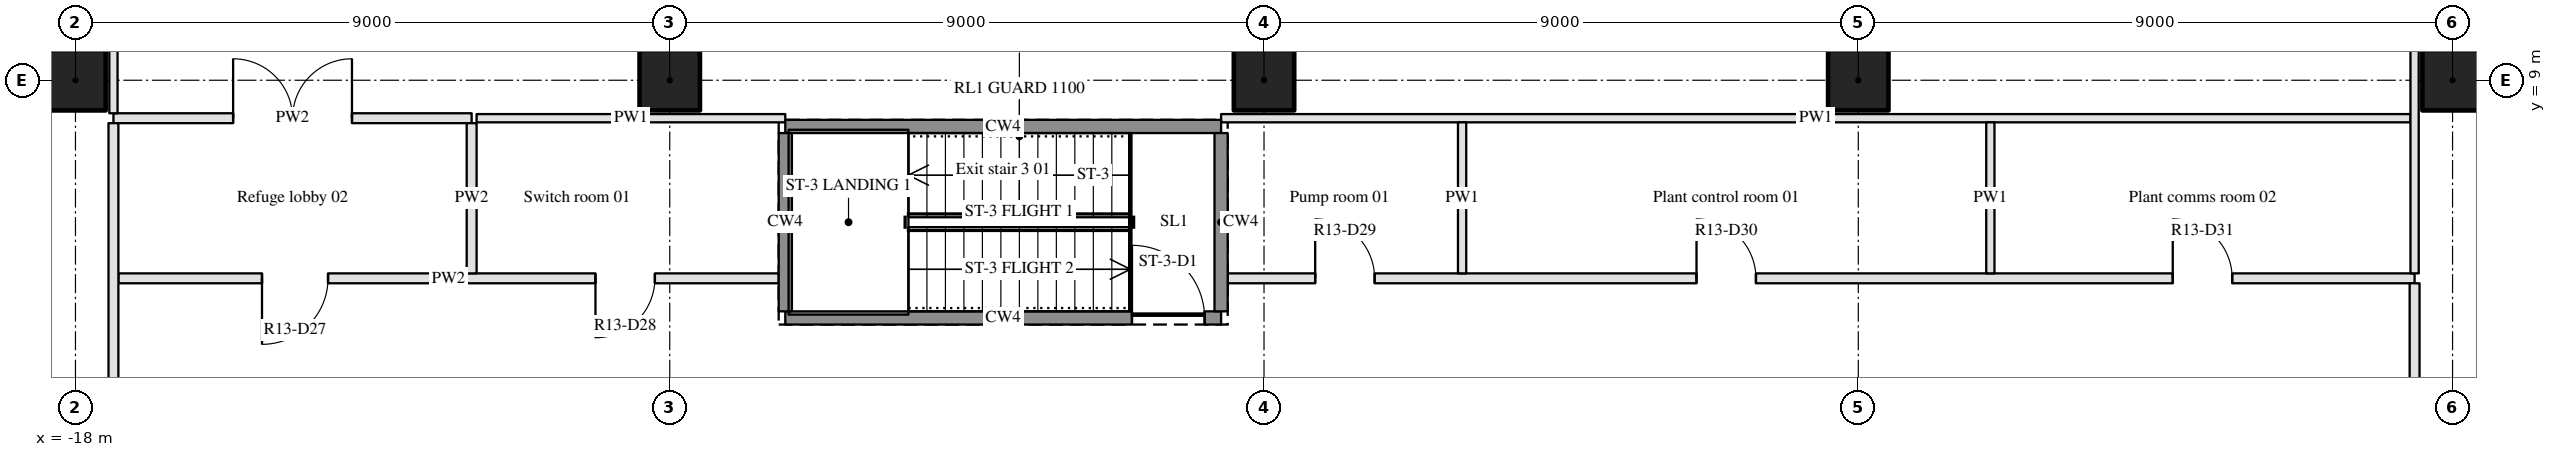
"""IFC4 building model, lengths in metres.
Left out: names, types, materials, properties, quantities, classifications, styles, units other than length and angle.
Written with IfcOpenShell. Run it as: python <this file> out.ifc"""

import sys

from ifc_helpers import new_model, si_unit, direction, frame, frame_2d, origin, origin_2d, place, context, subcontext, project, spatial, rectangle, hollow_circle, extrude, element, fill, save


model = new_model("IFC4")
c1 = context("Model", 3, precision=1e-05, world=origin(), true_north=direction((0.0, 1.0)))
c2 = subcontext(c1, "Body", "Model", "MODEL_VIEW")
j1 = project(units=[si_unit("LENGTHUNIT", "METRE"), si_unit("PLANEANGLEUNIT", "RADIAN")], contexts=[c1])
p1 = place(None, origin())
s1 = spatial("IfcSite", under=j1, at=p1, CompositionType="ELEMENT")
p2 = place(p1, origin())
s2 = spatial("IfcBuilding", under=s1, at=p2, CompositionType="ELEMENT")
p3 = place(p2, frame((0.0, 0.0, 57.6)))
s3 = spatial("IfcBuildingStorey", under=s2, at=p3, CompositionType="ELEMENT", Elevation=57.6)
for number, where, z_axis, x_axis in (
    (1, (-18.0, 9.0, 0.0), (0.0, 0.0, 1.0), (1.0, 0.0, 0.0)),
    (2, (-9.0, 9.0, 0.0), (0.0, 0.0, 1.0), (1.0, 0.0, 0.0)),
    (3, (0.0, 9.0, 0.0), (0.0, 0.0, 1.0), (1.0, 0.0, 0.0)),
    (4, (9.0, 9.0, 0.0), (0.0, 0.0, 1.0), (1.0, 0.0, 0.0)),
    (5, (18.0, 9.0, 0.0), (0.0, 0.0, 1.0), (1.0, 0.0, 0.0)),
):
    element("IfcColumn", number, at=place(p3, frame(where, z_axis=z_axis, x_axis=x_axis)), inside=s3, PredefinedType="COLUMN", context=c2, shape_type="SweptSolid", body=[
        extrude(hollow_circle(Radius=0.457, WallThickness=0.05, at=origin_2d()), origin(), (0.0, 0.0, 1.0), 4.5),
    ])
p4 = place(p3, frame((-7.25, 5.4, 0.0), z_axis=(0.0, 0.0, 1.0), x_axis=(1.0, 0.0, 0.0)))
e6 = element("IfcWall", 6, at=p4, inside=s3, PredefinedType="SHEAR", context=c2, shape_type="SweptSolid", body=[
    extrude(rectangle(XDim=6.6, YDim=0.2, at=frame_2d((3.3, 0.0))), origin(), (0.0, 0.0, 1.0), 4.5),
])
p5 = place(p4, frame((5.25, 0.0, 0.0)))
e7 = element("IfcOpeningElement", 7, at=p5, cuts=e6, PredefinedType="OPENING", context=c2, shape_type="SweptSolid", body=[
    extrude(rectangle(XDim=1.1, YDim=2.1, at=frame_2d((0.55, 1.05))), frame((0.0, 0.11, 0.0), z_axis=(0.0, -1.0, 0.0), x_axis=(1.0, 0.0, 0.0)), (0.0, 0.0, 1.0), 0.22),
])
p6 = place(p3, frame((-7.35, 6.0, 0.0), z_axis=(0.0, 0.0, 1.0), x_axis=(-1.0, 0.0, 0.0)))
e8 = element("IfcWall", 8, at=p6, inside=s3, PredefinedType="PARTITIONING", context=c2, shape_type="SweptSolid", body=[
    extrude(rectangle(XDim=10.0, YDim=0.15, at=frame_2d((5.0, 0.0))), origin(), (0.0, 0.0, 1.0), 3.56),
])
p7 = place(p6, frame((6.825, 0.0, 0.0)))
e9 = element("IfcOpeningElement", 9, at=p7, cuts=e8, PredefinedType="OPENING", context=c2, shape_type="SweptSolid", body=[
    extrude(rectangle(XDim=1.0, YDim=2.1, at=frame_2d((0.5, 1.05))), frame((0.0, 0.085, 0.0), z_axis=(0.0, -1.0, 0.0), x_axis=(1.0, 0.0, 0.0)), (0.0, 0.0, 1.0), 0.17),
])
p8 = place(p6, frame((1.875, 0.0, 0.0)))
e10 = element("IfcOpeningElement", 10, at=p8, cuts=e8, PredefinedType="OPENING", context=c2, shape_type="SweptSolid", body=[
    extrude(rectangle(XDim=0.9, YDim=2.1, at=frame_2d((0.45, 1.05))), frame((0.0, 0.085, 0.0), z_axis=(0.0, -1.0, 0.0), x_axis=(1.0, 0.0, 0.0)), (0.0, 0.0, 1.0), 0.17),
])
p9 = place(p3, frame((-0.55, 6.0, 0.0), z_axis=(0.0, 0.0, 1.0), x_axis=(1.0, 0.0, 0.0)))
e11 = element("IfcWall", 11, at=p9, inside=s3, PredefinedType="PARTITIONING", context=c2, shape_type="SweptSolid", body=[
    extrude(rectangle(XDim=17.975, YDim=0.15, at=frame_2d((8.988, 0.0))), origin(), (0.0, 0.0, 1.0), 3.56),
])
p10 = place(p9, frame((1.325, 0.0, 0.0)))
e12 = element("IfcOpeningElement", 12, at=p10, cuts=e11, PredefinedType="OPENING", context=c2, shape_type="SweptSolid", body=[
    extrude(rectangle(XDim=0.9, YDim=2.1, at=frame_2d((0.45, 1.05))), frame((0.0, 0.085, 0.0), z_axis=(0.0, -1.0, 0.0), x_axis=(1.0, 0.0, 0.0)), (0.0, 0.0, 1.0), 0.17),
])
p11 = place(p9, frame((7.1, 0.0, 0.0)))
e13 = element("IfcOpeningElement", 13, at=p11, cuts=e11, PredefinedType="OPENING", context=c2, shape_type="SweptSolid", body=[
    extrude(rectangle(XDim=0.9, YDim=2.1, at=frame_2d((0.45, 1.05))), frame((0.0, 0.085, 0.0), z_axis=(0.0, -1.0, 0.0), x_axis=(1.0, 0.0, 0.0)), (0.0, 0.0, 1.0), 0.17),
])
p12 = place(p9, frame((14.312, 0.0, 0.0)))
e14 = element("IfcOpeningElement", 14, at=p12, cuts=e11, PredefinedType="OPENING", context=c2, shape_type="SweptSolid", body=[
    extrude(rectangle(XDim=0.9, YDim=2.1, at=frame_2d((0.45, 1.05))), frame((0.0, 0.085, 0.0), z_axis=(0.0, -1.0, 0.0), x_axis=(1.0, 0.0, 0.0)), (0.0, 0.0, 1.0), 0.17),
])
p13 = place(p3, frame((-7.25, 8.3, 0.0), z_axis=(0.0, 0.0, 1.0), x_axis=(1.0, 0.0, 0.0)))
e15 = element("IfcWall", 15, at=p13, inside=s3, PredefinedType="SHEAR", context=c2, shape_type="SweptSolid", body=[
    extrude(rectangle(XDim=6.6, YDim=0.2, at=frame_2d((3.3, 0.0))), origin(), (0.0, 0.0, 1.0), 4.5),
])
p14 = place(p3, frame((-17.425, 8.425, 0.0), z_axis=(0.0, 0.0, 1.0), x_axis=(1.0, 0.0, 0.0)))
e16 = element("IfcWall", 16, at=p14, inside=s3, PredefinedType="PARTITIONING", context=c2, shape_type="SweptSolid", body=[
    extrude(rectangle(XDim=5.425, YDim=0.15, at=frame_2d((2.712, 0.0))), origin(), (0.0, 0.0, 1.0), 3.56),
])
p15 = place(p14, frame((1.812, 0.0, 0.0)))
e17 = element("IfcOpeningElement", 17, at=p15, cuts=e16, PredefinedType="OPENING", context=c2, shape_type="SweptSolid", body=[
    extrude(rectangle(XDim=1.8, YDim=2.1, at=frame_2d((0.9, 1.05))), frame((0.0, 0.085, 0.0), z_axis=(0.0, -1.0, 0.0), x_axis=(1.0, 0.0, 0.0)), (0.0, 0.0, 1.0), 0.17),
])
p16 = place(p3, frame((-11.925, 8.425, 0.0), z_axis=(0.0, 0.0, 1.0), x_axis=(1.0, 0.0, 0.0)))
e18 = element("IfcWall", 18, at=p16, inside=s3, PredefinedType="PARTITIONING", context=c2, shape_type="SweptSolid", body=[
    extrude(rectangle(XDim=4.675, YDim=0.125, at=frame_2d((2.337, 0.0))), origin(), (0.0, 0.0, 1.0), 3.56),
])
p17 = place(p3, frame((-0.65, 8.425, 0.0), z_axis=(0.0, 0.0, 1.0), x_axis=(1.0, 0.0, 0.0)))
e19 = element("IfcWall", 19, at=p17, inside=s3, PredefinedType="PARTITIONING", context=c2, shape_type="SweptSolid", body=[
    extrude(rectangle(XDim=18.012, YDim=0.125, at=frame_2d((9.006, 0.0))), origin(), (0.0, 0.0, 1.0), 3.56),
])
p18 = place(p3, frame((-17.425, 8.35, 0.0), z_axis=(0.0, 0.0, 1.0), x_axis=(0.0, -1.0, 0.0)))
e20 = element("IfcWall", 20, at=p18, inside=s3, PredefinedType="PARTITIONING", context=c2, shape_type="SweptSolid", body=[
    extrude(rectangle(XDim=23.275, YDim=0.15, at=frame_2d((11.638, 0.0))), origin(), (0.0, 0.0, 1.0), 3.56),
])
p19 = place(p18, frame((19.413, 0.0, 0.0)))
e21 = element("IfcOpeningElement", 21, at=p19, cuts=e20, PredefinedType="OPENING", context=c2, shape_type="SweptSolid", body=[
    extrude(rectangle(XDim=1.8, YDim=2.1, at=frame_2d((0.9, 1.05))), frame((0.0, 0.085, 0.0), z_axis=(0.0, -1.0, 0.0), x_axis=(1.0, 0.0, 0.0)), (0.0, 0.0, 1.0), 0.17),
])
p20 = place(p18, frame((11.05, 0.0, 0.0)))
e22 = element("IfcOpeningElement", 22, at=p20, cuts=e20, PredefinedType="OPENING", context=c2, shape_type="SweptSolid", body=[
    extrude(rectangle(XDim=1.8, YDim=2.1, at=frame_2d((0.9, 1.05))), frame((0.0, 0.085, 0.0), z_axis=(0.0, -1.0, 0.0), x_axis=(1.0, 0.0, 0.0)), (0.0, 0.0, 1.0), 0.17),
])
p21 = place(p18, frame((6.0, 0.0, 0.0)))
e23 = element("IfcOpeningElement", 23, at=p21, cuts=e20, PredefinedType="OPENING", context=c2, shape_type="SweptSolid", body=[
    extrude(rectangle(XDim=1.8, YDim=2.1, at=frame_2d((0.9, 1.05))), frame((0.0, 0.085, 0.0), z_axis=(0.0, -1.0, 0.0), x_axis=(1.0, 0.0, 0.0)), (0.0, 0.0, 1.0), 0.17),
])
p22 = place(p3, frame((-17.425, 8.5, 0.0), z_axis=(0.0, 0.0, 1.0), x_axis=(0.0, 1.0, 0.0)))
e24 = element("IfcWall", 24, at=p22, inside=s3, PredefinedType="PARTITIONING", context=c2, shape_type="SweptSolid", body=[
    extrude(rectangle(XDim=17.557, YDim=0.125, at=frame_2d((8.778, 0.0))), origin(), (0.0, 0.0, 1.0), 3.56),
])
p23 = place(p3, frame((-12.0, 6.075, 0.0), z_axis=(0.0, 0.0, 1.0), x_axis=(0.0, 1.0, 0.0)))
e25 = element("IfcWall", 25, at=p23, inside=s3, PredefinedType="PARTITIONING", context=c2, shape_type="SweptSolid", body=[
    extrude(rectangle(XDim=2.275, YDim=0.15, at=frame_2d((1.138, 0.0))), origin(), (0.0, 0.0, 1.0), 3.56),
])
for number, where, z_axis, x_axis in (
    (26, (-7.25, 5.5, 0.0), (0.0, 0.0, 1.0), (0.0, 1.0, 0.0)),
    (27, (-0.65, 5.5, 0.0), (0.0, 0.0, 1.0), (0.0, 1.0, 0.0)),
):
    element("IfcWall", number, at=place(p3, frame(where, z_axis=z_axis, x_axis=x_axis)), inside=s3, PredefinedType="SHEAR", context=c2, shape_type="SweptSolid", body=[
        extrude(rectangle(XDim=2.7, YDim=0.2, at=frame_2d((1.35, 0.0))), origin(), (0.0, 0.0, 1.0), 4.5),
    ])
for number, where, z_axis, x_axis in (
    (28, (3.0, 6.075, 0.0), (0.0, 0.0, 1.0), (0.0, 1.0, 0.0)),
    (29, (11.0, 6.075, 0.0), (0.0, 0.0, 1.0), (0.0, 1.0, 0.0)),
):
    element("IfcWall", number, at=place(p3, frame(where, z_axis=z_axis, x_axis=x_axis)), inside=s3, PredefinedType="PARTITIONING", context=c2, shape_type="SweptSolid", body=[
        extrude(rectangle(XDim=2.288, YDim=0.125, at=frame_2d((1.144, 0.0))), origin(), (0.0, 0.0, 1.0), 3.56),
    ])
p24 = place(p3, frame((17.425, -14.925, 0.0), z_axis=(0.0, 0.0, 1.0), x_axis=(0.0, 1.0, 0.0)))
e30 = element("IfcWall", 30, at=p24, inside=s3, PredefinedType="PARTITIONING", context=c2, shape_type="SweptSolid", body=[
    extrude(rectangle(XDim=20.85, YDim=0.15, at=frame_2d((10.425, 0.0))), origin(), (0.0, 0.0, 1.0), 3.56),
])
p25 = place(p24, frame((6.562, 0.0, 0.0)))
e31 = element("IfcOpeningElement", 31, at=p25, cuts=e30, PredefinedType="OPENING", context=c2, shape_type="SweptSolid", body=[
    extrude(rectangle(XDim=1.8, YDim=2.1, at=frame_2d((0.9, 1.05))), frame((0.0, 0.085, 0.0), z_axis=(0.0, -1.0, 0.0), x_axis=(1.0, 0.0, 0.0)), (0.0, 0.0, 1.0), 0.17),
])
p26 = place(p24, frame((8.663, 0.0, 0.0)))
e32 = element("IfcOpeningElement", 32, at=p26, cuts=e30, PredefinedType="OPENING", context=c2, shape_type="SweptSolid", body=[
    extrude(rectangle(XDim=1.8, YDim=2.1, at=frame_2d((0.9, 1.05))), frame((0.0, 0.085, 0.0), z_axis=(0.0, -1.0, 0.0), x_axis=(1.0, 0.0, 0.0)), (0.0, 0.0, 1.0), 0.17),
])
p27 = place(p24, frame((16.988, 0.0, 0.0)))
e33 = element("IfcOpeningElement", 33, at=p27, cuts=e30, PredefinedType="OPENING", context=c2, shape_type="SweptSolid", body=[
    extrude(rectangle(XDim=1.8, YDim=2.1, at=frame_2d((0.9, 1.05))), frame((0.0, 0.085, 0.0), z_axis=(0.0, -1.0, 0.0), x_axis=(1.0, 0.0, 0.0)), (0.0, 0.0, 1.0), 0.17),
])
p28 = place(p3, frame((17.425, 6.075, 0.0), z_axis=(0.0, 0.0, 1.0), x_axis=(0.0, 1.0, 0.0)))
e34 = element("IfcWall", 34, at=p28, inside=s3, PredefinedType="PARTITIONING", context=c2, shape_type="SweptSolid", body=[
    extrude(rectangle(XDim=19.982, YDim=0.125, at=frame_2d((9.991, 0.0))), origin(), (0.0, 0.0, 1.0), 3.56),
])
p29 = place(p7, origin())
e35 = element("IfcDoor", 35, at=p29, inside=s3, OperationType="SINGLE_SWING_RIGHT", PredefinedType="DOOR", context=c2, shape_type="SweptSolid", body=[
    extrude(rectangle(XDim=1.0, YDim=2.1, at=frame_2d((0.5, 1.05))), frame((0.0, 0.025, 0.0), z_axis=(0.0, -1.0, 0.0), x_axis=(1.0, 0.0, 0.0)), (0.0, 0.0, 1.0), 0.05),
])
fill(e9, e35)
p30 = place(p15, origin())
e36 = element("IfcDoor", 36, at=p30, inside=s3, OperationType="DOUBLE_DOOR_SINGLE_SWING", PredefinedType="DOOR", context=c2, shape_type="SweptSolid", body=[
    extrude(rectangle(XDim=1.8, YDim=2.1, at=frame_2d((0.9, 1.05))), frame((0.0, 0.025, 0.0), z_axis=(0.0, -1.0, 0.0), x_axis=(1.0, 0.0, 0.0)), (0.0, 0.0, 1.0), 0.05),
])
fill(e17, e36)
p31 = place(p5, origin())
e37 = element("IfcDoor", 37, at=p31, inside=s3, OperationType="SINGLE_SWING_LEFT", PredefinedType="DOOR", context=c2, shape_type="SweptSolid", body=[
    extrude(rectangle(XDim=1.1, YDim=2.1, at=frame_2d((0.55, 1.05))), frame((0.0, 0.025, 0.0), z_axis=(0.0, -1.0, 0.0), x_axis=(1.0, 0.0, 0.0)), (0.0, 0.0, 1.0), 0.05),
])
fill(e7, e37)
p32 = place(p8, origin())
e38 = element("IfcDoor", 38, at=p32, inside=s3, OperationType="SINGLE_SWING_RIGHT", PredefinedType="DOOR", context=c2, shape_type="SweptSolid", body=[
    extrude(rectangle(XDim=0.9, YDim=2.1, at=frame_2d((0.45, 1.05))), frame((0.0, 0.025, 0.0), z_axis=(0.0, -1.0, 0.0), x_axis=(1.0, 0.0, 0.0)), (0.0, 0.0, 1.0), 0.05),
])
fill(e10, e38)
p33 = place(p10, origin())
e39 = element("IfcDoor", 39, at=p33, inside=s3, OperationType="SINGLE_SWING_LEFT", PredefinedType="DOOR", context=c2, shape_type="SweptSolid", body=[
    extrude(rectangle(XDim=0.9, YDim=2.1, at=frame_2d((0.45, 1.05))), frame((0.0, 0.025, 0.0), z_axis=(0.0, -1.0, 0.0), x_axis=(1.0, 0.0, 0.0)), (0.0, 0.0, 1.0), 0.05),
])
fill(e12, e39)
p34 = place(p11, origin())
e40 = element("IfcDoor", 40, at=p34, inside=s3, OperationType="SINGLE_SWING_LEFT", PredefinedType="DOOR", context=c2, shape_type="SweptSolid", body=[
    extrude(rectangle(XDim=0.9, YDim=2.1, at=frame_2d((0.45, 1.05))), frame((0.0, 0.025, 0.0), z_axis=(0.0, -1.0, 0.0), x_axis=(1.0, 0.0, 0.0)), (0.0, 0.0, 1.0), 0.05),
])
fill(e13, e40)
p35 = place(p12, origin())
e41 = element("IfcDoor", 41, at=p35, inside=s3, OperationType="SINGLE_SWING_LEFT", PredefinedType="DOOR", context=c2, shape_type="SweptSolid", body=[
    extrude(rectangle(XDim=0.9, YDim=2.1, at=frame_2d((0.45, 1.05))), frame((0.0, 0.025, 0.0), z_axis=(0.0, -1.0, 0.0), x_axis=(1.0, 0.0, 0.0)), (0.0, 0.0, 1.0), 0.05),
])
fill(e14, e41)
save(model, sys.argv[1])
